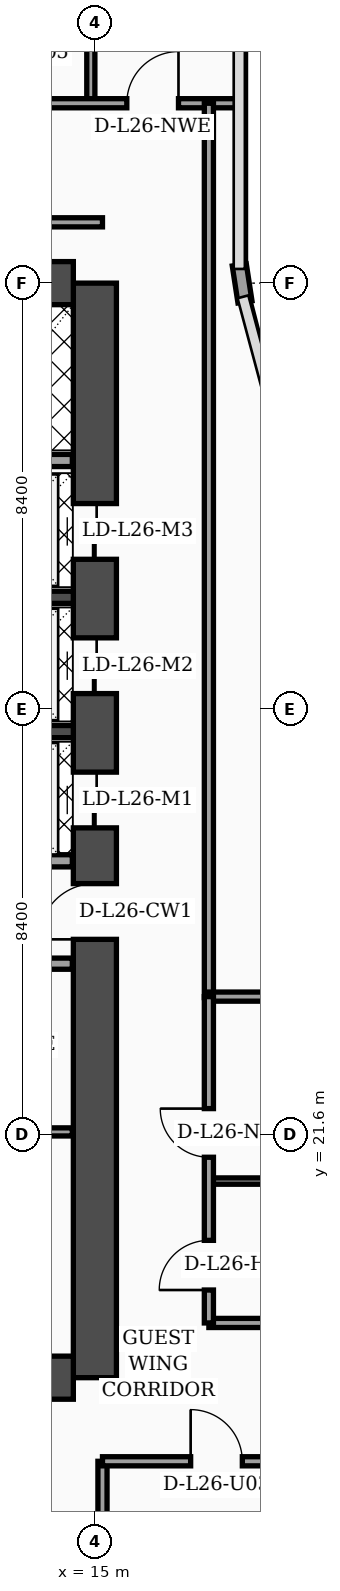
"""IFC4 building model, lengths in metres.
Left out: names, types, materials, properties, quantities, classifications, styles, units other than length and angle.
Written with IfcOpenShell. Run it as: python <this file> out.ifc"""

import sys

from ifc_helpers import new_model, si_unit, direction, frame, frame_2d, origin, place, context, subcontext, project, spatial, rectangle, extrude, element, fill, save


model = new_model("IFC4")
c1 = context("Model", 3, precision=1e-05, world=origin(), true_north=direction((0.0, 1.0)))
c2 = subcontext(c1, "Body", "Model", "MODEL_VIEW")
j1 = project(units=[si_unit("LENGTHUNIT", "METRE"), si_unit("PLANEANGLEUNIT", "RADIAN")], contexts=[c1])
p1 = place(None, origin())
s1 = spatial("IfcSite", under=j1, at=p1, CompositionType="ELEMENT")
p2 = place(p1, origin())
s2 = spatial("IfcBuilding", under=s1, at=p2, CompositionType="ELEMENT")
p3 = place(p2, frame((0.0, 0.0, 108.8)))
s3 = spatial("IfcBuildingStorey", under=s2, at=p3, CompositionType="ELEMENT", Elevation=108.8)
p4 = place(p3, frame((15.0, 16.8, 0.0), z_axis=(0.0, 0.0, 1.0), x_axis=(0.0, 1.0, 0.0)))
e1 = element("IfcWall", 1, at=p4, inside=s3, PredefinedType="SHEAR", context=c2, shape_type="SweptSolid", body=[
    extrude(rectangle(XDim=21.6, YDim=0.85, at=frame_2d((10.8, 0.0))), origin(), (0.0, 0.0, 1.0), 3.56),
])
p5 = place(p4, frame((8.65, 0.0, 0.0)))
e2 = element("IfcOpeningElement", 2, at=p5, cuts=e1, PredefinedType="OPENING", context=c2, shape_type="SweptSolid", body=[
    extrude(rectangle(XDim=1.1, YDim=2.2, at=frame_2d((0.55, 1.1))), frame((0.0, 0.435, 0.0), z_axis=(0.0, -1.0, 0.0), x_axis=(1.0, 0.0, 0.0)), (0.0, 0.0, 1.0), 0.87),
])
p6 = place(p4, frame((10.85, 0.0, 0.0)))
e3 = element("IfcOpeningElement", 3, at=p6, cuts=e1, PredefinedType="OPENING", context=c2, shape_type="SweptSolid", body=[
    extrude(rectangle(XDim=1.1, YDim=2.2, at=frame_2d((0.55, 1.1))), frame((0.0, 0.435, 0.0), z_axis=(0.0, -1.0, 0.0), x_axis=(1.0, 0.0, 0.0)), (0.0, 0.0, 1.0), 0.87),
])
p7 = place(p4, frame((13.5, 0.0, 0.0)))
e4 = element("IfcOpeningElement", 4, at=p7, cuts=e1, PredefinedType="OPENING", context=c2, shape_type="SweptSolid", body=[
    extrude(rectangle(XDim=1.1, YDim=2.2, at=frame_2d((0.55, 1.1))), frame((0.0, 0.435, 0.0), z_axis=(0.0, -1.0, 0.0), x_axis=(1.0, 0.0, 0.0)), (0.0, 0.0, 1.0), 0.87),
])
p8 = place(p4, frame((16.15, 0.0, 0.0)))
e5 = element("IfcOpeningElement", 5, at=p8, cuts=e1, PredefinedType="OPENING", context=c2, shape_type="SweptSolid", body=[
    extrude(rectangle(XDim=1.1, YDim=2.2, at=frame_2d((0.55, 1.1))), frame((0.0, 0.435, 0.0), z_axis=(0.0, -1.0, 0.0), x_axis=(1.0, 0.0, 0.0)), (0.0, 0.0, 1.0), 0.87),
])
for number, where, z_axis, x_axis in (
    (6, (4.625, 38.4, 0.0), (0.0, 0.0, 1.0), (1.0, 0.0, 0.0)),
    (7, (4.625, 16.8, 0.0), (0.0, 0.0, 1.0), (1.0, 0.0, 0.0)),
):
    element("IfcWall", number, at=place(p3, frame(where, z_axis=z_axis, x_axis=x_axis)), inside=s3, PredefinedType="SHEAR", context=c2, shape_type="SweptSolid", body=[
        extrude(rectangle(XDim=9.95, YDim=0.85, at=frame_2d((4.975, 0.0))), origin(), (0.0, 0.0, 1.0), 3.56),
    ])
for number, where, z_axis, x_axis in (
    (8, (12.18, 29.55, 0.0), (0.0, 0.0, 1.0), (1.0, 0.0, 0.0)),
    (9, (12.18, 32.2, 0.0), (0.0, 0.0, 1.0), (1.0, 0.0, 0.0)),
):
    element("IfcWall", number, at=place(p3, frame(where, z_axis=z_axis, x_axis=x_axis)), inside=s3, PredefinedType="SOLIDWALL", context=c2, shape_type="SweptSolid", body=[
        extrude(rectangle(XDim=2.395, YDim=0.24, at=frame_2d((1.198, 0.0))), origin(), (0.0, 0.0, 1.0), 3.56),
    ])
p9 = place(p3, frame((17.962, 38.03, 0.0), z_axis=(0.0, 0.0, 1.0), x_axis=(-0.15141125477, 0.988470855377, 0.0)))
e10 = element("IfcWall", 10, at=p9, inside=s3, PredefinedType="SOLIDWALL", context=c2, shape_type="SweptSolid", body=[
    extrude(rectangle(XDim=0.739, YDim=0.28, at=frame_2d((0.369, 0.0))), origin(), (0.0, 0.0, 1.0), 3.56),
])
p10 = place(p3, frame((9.68, 21.65, 0.0), z_axis=(0.0, 0.0, 1.0), x_axis=(1.0, 0.0, 0.0)))
e11 = element("IfcWall", 11, at=p10, inside=s3, PredefinedType="PARTITIONING", context=c2, shape_type="SweptSolid", body=[
    extrude(rectangle(XDim=4.875, YDim=0.16, at=frame_2d((2.438, 0.0))), origin(), (0.0, 0.0, 1.0), 3.09),
])
p11 = place(p10, frame((1.1, 0.0, 0.0)))
e12 = element("IfcOpeningElement", 12, at=p11, cuts=e11, PredefinedType="OPENING", context=c2, shape_type="SweptSolid", body=[
    extrude(rectangle(XDim=0.98, YDim=2.15, at=frame_2d((0.49, 1.075))), frame((0.0, 0.09, 0.0), z_axis=(0.0, -1.0, 0.0), x_axis=(1.0, 0.0, 0.0)), (0.0, 0.0, 1.0), 0.18),
])
p12 = place(p3, frame((9.68, 24.97, 0.0), z_axis=(0.0, 0.0, 1.0), x_axis=(1.0, 0.0, 0.0)))
e13 = element("IfcWall", 13, at=p12, inside=s3, PredefinedType="SOLIDWALL", context=c2, shape_type="SweptSolid", body=[
    extrude(rectangle(XDim=4.875, YDim=0.22, at=frame_2d((2.438, 0.0))), origin(), (0.0, 0.0, 1.0), 2.84),
])
p13 = place(p12, frame((0.9, 0.0, 0.0)))
e14 = element("IfcOpeningElement", 14, at=p13, cuts=e13, PredefinedType="OPENING", context=c2, shape_type="SweptSolid", body=[
    extrude(rectangle(XDim=0.98, YDim=2.15, at=frame_2d((0.49, 1.075))), frame((0.0, 0.12, 0.0), z_axis=(0.0, -1.0, 0.0), x_axis=(1.0, 0.0, 0.0)), (0.0, 0.0, 1.0), 0.24),
])
p14 = place(p3, frame((12.25, 27.0, 0.0), z_axis=(0.0, 0.0, 1.0), x_axis=(1.0, 0.0, 0.0)))
e15 = element("IfcWall", 15, at=p14, inside=s3, PredefinedType="SOLIDWALL", context=c2, shape_type="SweptSolid", body=[
    extrude(rectangle(XDim=2.305, YDim=0.24, at=frame_2d((1.152, 0.0))), origin(), (0.0, 0.0, 1.0), 3.56),
])
p15 = place(p3, frame((9.66, 34.9, 0.0), z_axis=(0.0, 0.0, 1.0), x_axis=(1.0, 0.0, 0.0)))
e16 = element("IfcWall", 16, at=p15, inside=s3, PredefinedType="SOLIDWALL", context=c2, shape_type="SweptSolid", body=[
    extrude(rectangle(XDim=4.895, YDim=0.24, at=frame_2d((2.448, 0.0))), origin(), (0.0, 0.0, 1.0), 3.56),
])
p16 = place(p3, frame((15.15, 2.44, 0.0), z_axis=(0.0, 0.0, 1.0), x_axis=(0.0, 1.0, 0.0)))
e17 = element("IfcWall", 17, at=p16, inside=s3, PredefinedType="PARTITIONING", context=c2, shape_type="SweptSolid", body=[
    extrude(rectangle(XDim=12.71, YDim=0.18, at=frame_2d((6.355, 0.0))), origin(), (0.0, 0.0, 1.0), 3.04),
])
p17 = place(p3, frame((15.15, 15.15, 0.0), z_axis=(0.0, 0.0, 1.0), x_axis=(1.0, 0.0, 0.0)))
e18 = element("IfcWall", 18, at=p17, inside=s3, PredefinedType="PARTITIONING", context=c2, shape_type="SweptSolid", body=[
    extrude(rectangle(XDim=6.45, YDim=0.18, at=frame_2d((3.225, 0.0))), origin(), (0.0, 0.0, 1.0), 2.49),
])
p18 = place(p17, frame((1.74, 0.0, 0.0)))
e19 = element("IfcOpeningElement", 19, at=p18, cuts=e18, PredefinedType="OPENING", context=c2, shape_type="SweptSolid", body=[
    extrude(rectangle(XDim=1.02, YDim=2.2, at=frame_2d((0.51, 1.1))), frame((0.0, 0.1, 0.0), z_axis=(0.0, -1.0, 0.0), x_axis=(1.0, 0.0, 0.0)), (0.0, 0.0, 1.0), 0.2),
])
p19 = place(p3, frame((14.92, 41.95, 0.0), z_axis=(0.0, 0.0, 1.0), x_axis=(0.0, 1.0, 0.0)))
e20 = element("IfcWall", 20, at=p19, inside=s3, PredefinedType="PARTITIONING", context=c2, shape_type="SweptSolid", body=[
    extrude(rectangle(XDim=5.85, YDim=0.16, at=frame_2d((2.925, 0.0))), origin(), (0.0, 0.0, 1.0), 3.04),
])
p20 = place(p3, frame((0.08, 41.95, 0.0), z_axis=(0.0, 0.0, 1.0), x_axis=(1.0, 0.0, 0.0)))
e21 = element("IfcWall", 21, at=p20, inside=s3, PredefinedType="PARTITIONING", context=c2, shape_type="SweptSolid", body=[
    extrude(rectangle(XDim=17.77, YDim=0.18, at=frame_2d((8.885, 0.0))), origin(), (0.0, 0.0, 1.0), 2.84),
])
p21 = place(p20, frame((0.9, 0.0, 0.0)))
e22 = element("IfcOpeningElement", 22, at=p21, cuts=e21, PredefinedType="OPENING", context=c2, shape_type="SweptSolid", body=[
    extrude(rectangle(XDim=1.02, YDim=2.2, at=frame_2d((0.51, 1.1))), frame((0.0, 0.1, 0.0), z_axis=(0.0, -1.0, 0.0), x_axis=(1.0, 0.0, 0.0)), (0.0, 0.0, 1.0), 0.2),
])
p22 = place(p20, frame((4.9, 0.0, 0.0)))
e23 = element("IfcOpeningElement", 23, at=p22, cuts=e21, PredefinedType="OPENING", context=c2, shape_type="SweptSolid", body=[
    extrude(rectangle(XDim=1.02, YDim=2.2, at=frame_2d((0.51, 1.1))), frame((0.0, 0.1, 0.0), z_axis=(0.0, -1.0, 0.0), x_axis=(1.0, 0.0, 0.0)), (0.0, 0.0, 1.0), 0.2),
])
p23 = place(p20, frame((10.78, 0.0, 0.0)))
e24 = element("IfcOpeningElement", 24, at=p23, cuts=e21, PredefinedType="OPENING", context=c2, shape_type="SweptSolid", body=[
    extrude(rectangle(XDim=1.02, YDim=2.2, at=frame_2d((0.51, 1.1))), frame((0.0, 0.1, 0.0), z_axis=(0.0, -1.0, 0.0), x_axis=(1.0, 0.0, 0.0)), (0.0, 0.0, 1.0), 0.2),
])
p24 = place(p20, frame((15.55, 0.0, 0.0)))
e25 = element("IfcOpeningElement", 25, at=p24, cuts=e21, PredefinedType="OPENING", context=c2, shape_type="SweptSolid", body=[
    extrude(rectangle(XDim=1.02, YDim=2.2, at=frame_2d((0.51, 1.1))), frame((0.0, 0.1, 0.0), z_axis=(0.0, -1.0, 0.0), x_axis=(1.0, 0.0, 0.0)), (0.0, 0.0, 1.0), 0.2),
])
p25 = place(p3, frame((17.25, 24.3, 0.0), z_axis=(0.0, 0.0, 1.0), x_axis=(0.0, 1.0, 0.0)))
e26 = element("IfcWall", 26, at=p25, inside=s3, PredefinedType="PARTITIONING", context=c2, shape_type="SweptSolid", body=[
    extrude(rectangle(XDim=17.65, YDim=0.18, at=frame_2d((8.825, 0.0))), origin(), (0.0, 0.0, 1.0), 2.84),
])
p26 = place(p3, frame((3.755, 39.6, 0.0), z_axis=(0.0, 0.0, 1.0), x_axis=(1.0, 0.0, 0.0)))
e27 = element("IfcWall", 27, at=p26, inside=s3, PredefinedType="PARTITIONING", context=c2, shape_type="SweptSolid", body=[
    extrude(rectangle(XDim=11.395, YDim=0.18, at=frame_2d((5.698, 0.0))), origin(), (0.0, 0.0, 1.0), 2.84),
])
p27 = place(p3, frame((17.25, 17.88, 0.0), z_axis=(0.0, 0.0, 1.0), x_axis=(1.0, 0.0, 0.0)))
e28 = element("IfcWall", 28, at=p27, inside=s3, PredefinedType="PARTITIONING", context=c2, shape_type="SweptSolid", body=[
    extrude(rectangle(XDim=4.3, YDim=0.18, at=frame_2d((2.15, 0.0))), origin(), (0.0, 0.0, 1.0), 3.56),
])
p28 = place(p3, frame((17.25, 20.68, 0.0), z_axis=(0.0, 0.0, 1.0), x_axis=(1.0, 0.0, 0.0)))
e29 = element("IfcWall", 29, at=p28, inside=s3, PredefinedType="PARTITIONING", context=c2, shape_type="SweptSolid", body=[
    extrude(rectangle(XDim=4.3, YDim=0.125, at=frame_2d((2.15, 0.0))), origin(), (0.0, 0.0, 1.0), 3.56),
])
p29 = place(p3, frame((17.25, 24.32, 0.0), z_axis=(0.0, 0.0, 1.0), x_axis=(1.0, 0.0, 0.0)))
e30 = element("IfcWall", 30, at=p29, inside=s3, PredefinedType="PARTITIONING", context=c2, shape_type="SweptSolid", body=[
    extrude(rectangle(XDim=4.35, YDim=0.18, at=frame_2d((2.175, 0.0))), origin(), (0.0, 0.0, 1.0), 3.56),
])
p30 = place(p3, frame((17.25, 17.88, 0.0), z_axis=(0.0, 0.0, 1.0), x_axis=(0.0, 1.0, 0.0)))
e31 = element("IfcWall", 31, at=p30, inside=s3, PredefinedType="PARTITIONING", context=c2, shape_type="SweptSolid", body=[
    extrude(rectangle(XDim=6.44, YDim=0.18, at=frame_2d((3.22, 0.0))), origin(), (0.0, 0.0, 1.0), 3.09),
])
p31 = place(p30, frame((0.65, 0.0, 0.0)))
e32 = element("IfcOpeningElement", 32, at=p31, cuts=e31, PredefinedType="OPENING", context=c2, shape_type="SweptSolid", body=[
    extrude(rectangle(XDim=0.98, YDim=2.15, at=frame_2d((0.49, 1.075))), frame((0.0, 0.1, 0.0), z_axis=(0.0, -1.0, 0.0), x_axis=(1.0, 0.0, 0.0)), (0.0, 0.0, 1.0), 0.2),
])
p32 = place(p30, frame((3.27, 0.0, 0.0)))
e33 = element("IfcOpeningElement", 33, at=p32, cuts=e31, PredefinedType="OPENING", context=c2, shape_type="SweptSolid", body=[
    extrude(rectangle(XDim=0.96, YDim=2.2, at=frame_2d((0.48, 1.1))), frame((0.0, 0.1, 0.0), z_axis=(0.0, -1.0, 0.0), x_axis=(1.0, 0.0, 0.0)), (0.0, 0.0, 1.0), 0.2),
])
p33 = place(p18, origin())
e34 = element("IfcDoor", 34, at=p33, inside=s3, OperationType="SINGLE_SWING_LEFT", PredefinedType="DOOR", context=c2, shape_type="SweptSolid", body=[
    extrude(rectangle(XDim=1.02, YDim=2.2, at=frame_2d((0.51, 1.1))), frame((0.0, 0.025, 0.0), z_axis=(0.0, -1.0, 0.0), x_axis=(1.0, 0.0, 0.0)), (0.0, 0.0, 1.0), 0.05),
])
fill(e19, e34)
p34 = place(p24, origin())
e35 = element("IfcDoor", 35, at=p34, inside=s3, OperationType="SINGLE_SWING_RIGHT", PredefinedType="DOOR", context=c2, shape_type="SweptSolid", body=[
    extrude(rectangle(XDim=1.02, YDim=2.2, at=frame_2d((0.51, 1.1))), frame((0.0, 0.025, 0.0), z_axis=(0.0, -1.0, 0.0), x_axis=(1.0, 0.0, 0.0)), (0.0, 0.0, 1.0), 0.05),
])
fill(e25, e35)
p35 = place(p31, origin())
e36 = element("IfcDoor", 36, at=p35, inside=s3, OperationType="SINGLE_SWING_LEFT", PredefinedType="DOOR", context=c2, shape_type="SweptSolid", body=[
    extrude(rectangle(XDim=0.98, YDim=2.15, at=frame_2d((0.49, 1.075))), frame((0.0, 0.025, 0.0), z_axis=(0.0, -1.0, 0.0), x_axis=(1.0, 0.0, 0.0)), (0.0, 0.0, 1.0), 0.05),
])
fill(e32, e36)
p36 = place(p32, origin())
e37 = element("IfcDoor", 37, at=p36, inside=s3, OperationType="SINGLE_SWING_RIGHT", PredefinedType="DOOR", context=c2, shape_type="SweptSolid", body=[
    extrude(rectangle(XDim=0.96, YDim=2.2, at=frame_2d((0.48, 1.1))), frame((0.0, 0.025, 0.0), z_axis=(0.0, -1.0, 0.0), x_axis=(1.0, 0.0, 0.0)), (0.0, 0.0, 1.0), 0.05),
])
fill(e33, e37)
p37 = place(p5, origin())
e38 = element("IfcDoor", 38, at=p37, inside=s3, OperationType="SINGLE_SWING_LEFT", PredefinedType="DOOR", context=c2, shape_type="SweptSolid", body=[
    extrude(rectangle(XDim=1.1, YDim=2.2, at=frame_2d((0.55, 1.1))), frame((0.0, 0.025, 0.0), z_axis=(0.0, -1.0, 0.0), x_axis=(1.0, 0.0, 0.0)), (0.0, 0.0, 1.0), 0.05),
])
fill(e2, e38)
p38 = place(p6, origin())
e39 = element("IfcDoor", 39, at=p38, inside=s3, OperationType="DOUBLE_DOOR_SLIDING", PredefinedType="DOOR", context=c2, shape_type="SweptSolid", body=[
    extrude(rectangle(XDim=1.1, YDim=2.2, at=frame_2d((0.55, 1.1))), frame((0.0, 0.025, 0.0), z_axis=(0.0, -1.0, 0.0), x_axis=(1.0, 0.0, 0.0)), (0.0, 0.0, 1.0), 0.05),
])
fill(e3, e39)
p39 = place(p7, origin())
e40 = element("IfcDoor", 40, at=p39, inside=s3, OperationType="DOUBLE_DOOR_SLIDING", PredefinedType="DOOR", context=c2, shape_type="SweptSolid", body=[
    extrude(rectangle(XDim=1.1, YDim=2.2, at=frame_2d((0.55, 1.1))), frame((0.0, 0.025, 0.0), z_axis=(0.0, -1.0, 0.0), x_axis=(1.0, 0.0, 0.0)), (0.0, 0.0, 1.0), 0.05),
])
fill(e4, e40)
p40 = place(p8, origin())
e41 = element("IfcDoor", 41, at=p40, inside=s3, OperationType="DOUBLE_DOOR_SLIDING", PredefinedType="DOOR", context=c2, shape_type="SweptSolid", body=[
    extrude(rectangle(XDim=1.1, YDim=2.2, at=frame_2d((0.55, 1.1))), frame((0.0, 0.025, 0.0), z_axis=(0.0, -1.0, 0.0), x_axis=(1.0, 0.0, 0.0)), (0.0, 0.0, 1.0), 0.05),
])
fill(e5, e41)
save(model, sys.argv[1])
